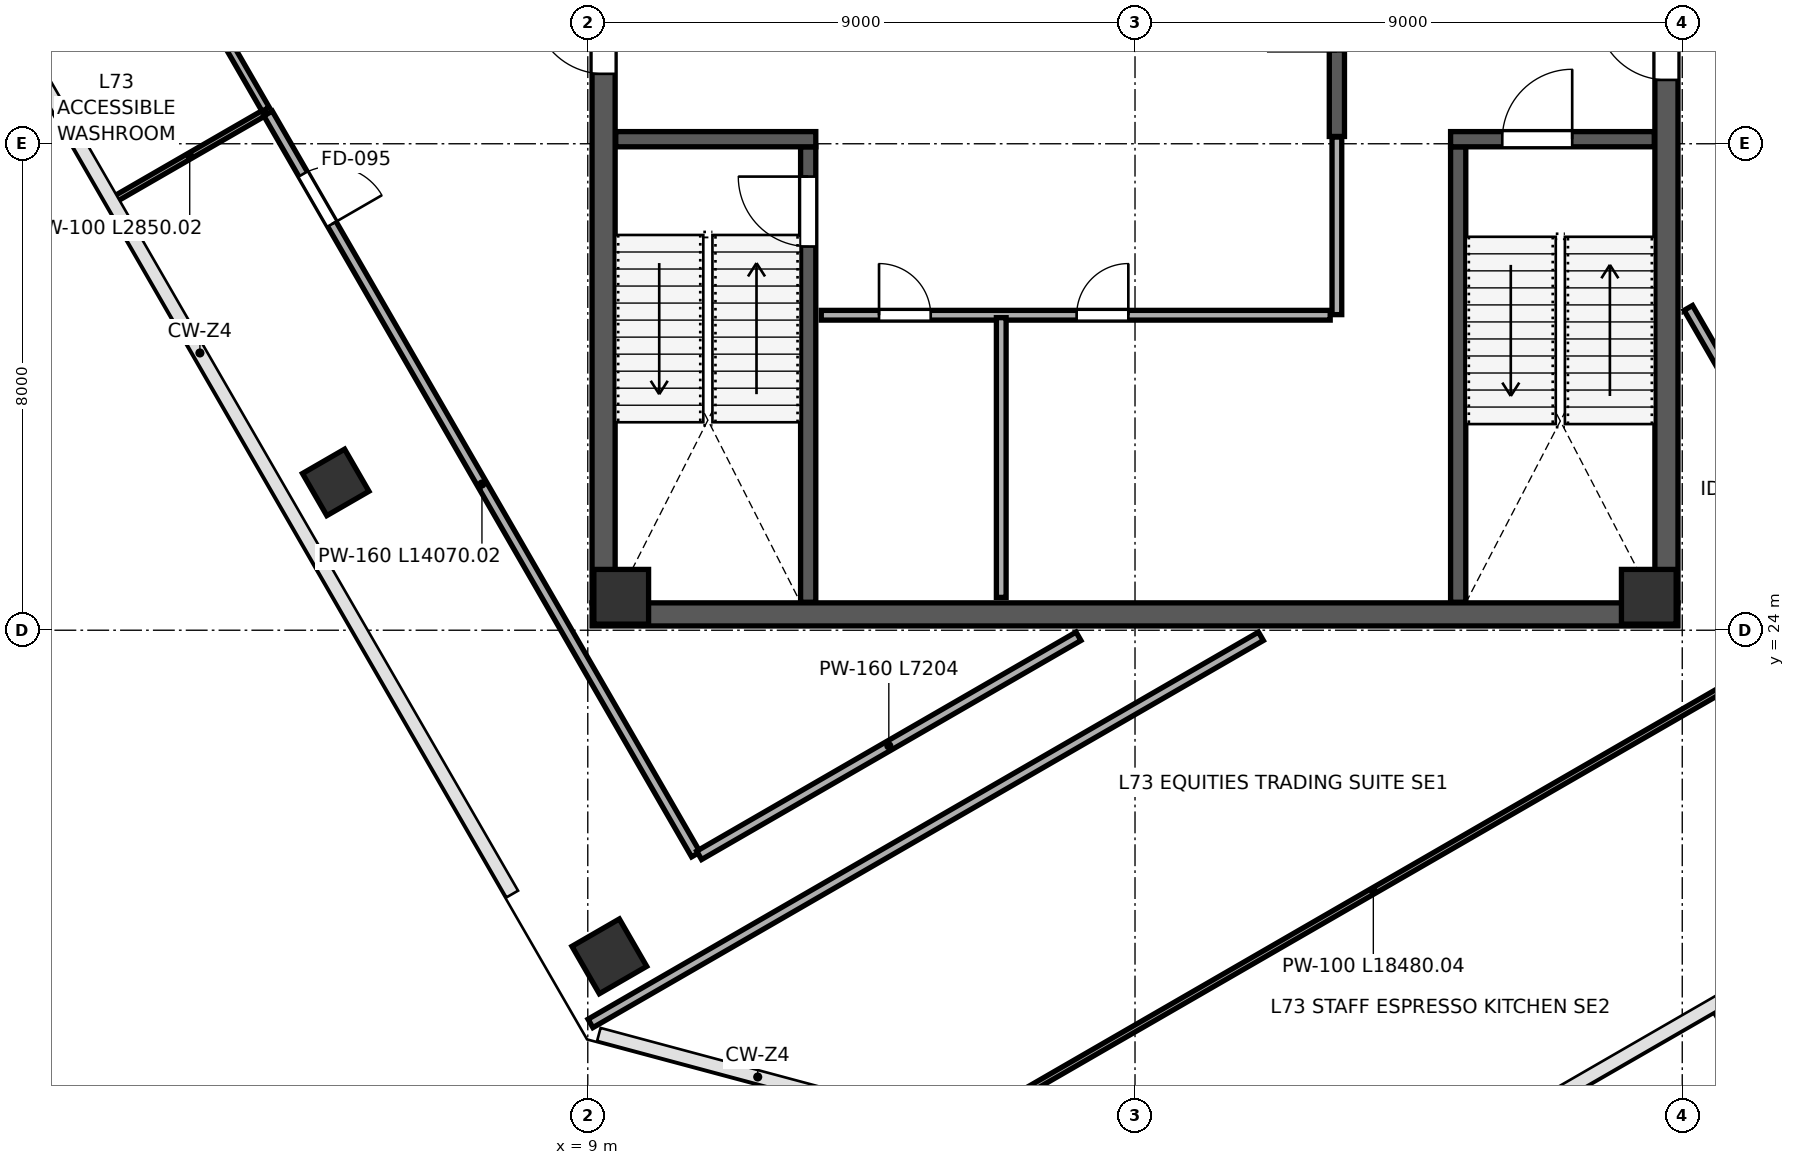
"""IFC4 building model, lengths in metres.
Left out: names, types, materials, properties, quantities, classifications, styles, units other than length and angle.
Written with IfcOpenShell. Run it as: python <this file> out.ifc"""

import sys

from ifc_helpers import new_model, si_unit, direction, frame, frame_2d, origin, origin_2d, place, context, subcontext, project, spatial, rectangle, extrude, clip, halfspace, source, transform, mapped, element, fill, save


model = new_model("IFC4")
c1 = context("Model", 3, precision=1e-05, world=origin(), true_north=direction((0.0, 1.0)))
c2 = subcontext(c1, "Body", "Model", "MODEL_VIEW")
j1 = project(units=[si_unit("LENGTHUNIT", "METRE"), si_unit("PLANEANGLEUNIT", "RADIAN")], contexts=[c1])
p1 = place(None, origin())
s1 = spatial("IfcSite", under=j1, at=p1, CompositionType="ELEMENT")
p2 = place(p1, origin())
s2 = spatial("IfcBuilding", under=s1, at=p2, CompositionType="ELEMENT")
p3 = place(p2, frame((0.0, 0.0, 324.0)))
s3 = spatial("IfcBuildingStorey", under=s2, at=p3, CompositionType="ELEMENT", Elevation=324.0)
m1 = source(origin(), c2, "Body", "SweptSolid", [
    extrude(rectangle(XDim=0.9, YDim=0.9, at=origin_2d()), origin(), (0.0, 0.0, 1.0), 4.198),
])
for number, where, z_axis, x_axis in (
    (1, (9.55, 24.55, 0.001), (0.0, 0.0, 1.0), (1.0, 0.0, 0.0)),
    (2, (26.45, 24.55, 0.001), (0.0, 0.0, 1.0), (1.0, 0.0, 0.0)),
):
    element("IfcColumn", number, at=place(p3, frame(where, z_axis=z_axis, x_axis=x_axis)), inside=s3, PredefinedType="COLUMN", context=c2, shape_type="MappedRepresentation", body=[
        mapped(m1, transform((0.0, 0.0, 0.0), scale=1.0)),
    ])
p4 = place(p3, frame((4.854, 26.431, 0.0), z_axis=(-0.053240348787, 0.171329844216, 0.983774135532), x_axis=(0.73030076738, -0.665221355242, 0.155374829666)))
e3 = element("IfcColumn", 3, at=p4, inside=s3, PredefinedType="COLUMN", context=c2, shape_type="Clipping", body=[
    clip(clip(extrude(rectangle(XDim=0.8, YDim=0.8, at=origin_2d()), origin(), (0.0, 0.0, 1.0), 4.269), halfspace(frame((0.0, 0.0, 0.1), z_axis=(0.0, 0.0, -1.0), x_axis=(1.0, 0.0, 0.0)), False)), halfspace(frame((0.0, 0.0, 4.169), z_axis=(0.0, 0.0, 1.0), x_axis=(1.0, 0.0, 0.0)), False)),
])
p5 = place(p3, frame((9.354, 18.637, 0.0), z_axis=(-0.133747241833, 0.126948471317, 0.982850833511), x_axis=(0.961573158376, -0.223324610803, 0.159697148693)))
e4 = element("IfcColumn", 4, at=p5, inside=s3, PredefinedType="COLUMN", context=c2, shape_type="Clipping", body=[
    clip(clip(extrude(rectangle(XDim=0.9, YDim=0.9, at=origin_2d()), origin(), (0.0, 0.0, 1.0), 4.273), halfspace(frame((0.0, 0.0, 0.116), z_axis=(0.0, 0.0, -1.0), x_axis=(1.0, 0.0, 0.0)), False)), halfspace(frame((0.0, 0.0, 4.157), z_axis=(0.0, 0.0, 1.0), x_axis=(1.0, 0.0, 0.0)), False)),
])
p6 = place(p3, frame((9.26, 24.45, 0.0), z_axis=(0.0, 0.0, 1.0), x_axis=(0.0, 1.0, 0.0)))
e5 = element("IfcWall", 5, at=p6, inside=s3, PredefinedType="SHEAR", context=c2, shape_type="SweptSolid", body=[
    extrude(rectangle(XDim=15.1, YDim=0.38, at=frame_2d((7.55, 0.0))), origin(), (0.0, 0.0, 1.0), 3.96),
])
p7 = place(p6, frame((8.7, 0.0, 0.0)))
e6 = element("IfcOpeningElement", 6, at=p7, cuts=e5, PredefinedType="OPENING", context=c2, shape_type="SweptSolid", body=[
    extrude(rectangle(XDim=1.15, YDim=2.2, at=frame_2d((0.575, 1.1))), frame((0.0, 0.2, 0.0), z_axis=(0.0, -1.0, 0.0), x_axis=(1.0, 0.0, 0.0)), (0.0, 0.0, 1.0), 0.4),
])
p8 = place(p3, frame((26.74, 24.45, 0.0), z_axis=(0.0, 0.0, 1.0), x_axis=(0.0, 1.0, 0.0)))
e7 = element("IfcWall", 7, at=p8, inside=s3, PredefinedType="SHEAR", context=c2, shape_type="SweptSolid", body=[
    extrude(rectangle(XDim=15.1, YDim=0.38, at=frame_2d((7.55, 0.0))), origin(), (0.0, 0.0, 1.0), 3.96),
])
p9 = place(p8, frame((8.6, 0.0, 0.0)))
e8 = element("IfcOpeningElement", 8, at=p9, cuts=e7, PredefinedType="OPENING", context=c2, shape_type="SweptSolid", body=[
    extrude(rectangle(XDim=1.15, YDim=2.2, at=frame_2d((0.575, 1.1))), frame((0.0, 0.2, 0.0), z_axis=(0.0, -1.0, 0.0), x_axis=(1.0, 0.0, 0.0)), (0.0, 0.0, 1.0), 0.4),
])
p10 = place(p3, frame((9.07, 24.26, 0.0), z_axis=(0.0, 0.0, 1.0), x_axis=(1.0, 0.0, 0.0)))
e9 = element("IfcWall", 9, at=p10, inside=s3, PredefinedType="SHEAR", context=c2, shape_type="SweptSolid", body=[
    extrude(rectangle(XDim=17.86, YDim=0.38, at=frame_2d((8.93, 0.0))), origin(), (0.0, 0.0, 1.0), 3.96),
])
p11 = place(p3, frame((12.625, 24.46, 0.0), z_axis=(0.0, 0.0, 1.0), x_axis=(0.0, 1.0, 0.0)))
e10 = element("IfcWall", 10, at=p11, inside=s3, PredefinedType="SHEAR", context=c2, shape_type="SweptSolid", body=[
    extrude(rectangle(XDim=7.49, YDim=0.25, at=frame_2d((3.745, 0.0))), origin(), (0.0, 0.0, 1.0), 3.96),
])
p12 = place(p11, frame((5.85, 0.0, 0.0)))
e11 = element("IfcOpeningElement", 11, at=p12, cuts=e10, PredefinedType="OPENING", context=c2, shape_type="SweptSolid", body=[
    extrude(rectangle(XDim=1.15, YDim=2.2, at=frame_2d((0.575, 1.1))), frame((0.0, 0.135, 0.0), z_axis=(0.0, -1.0, 0.0), x_axis=(1.0, 0.0, 0.0)), (0.0, 0.0, 1.0), 0.27),
])
p13 = place(p3, frame((9.46, 32.075, 0.0), z_axis=(0.0, 0.0, 1.0), x_axis=(1.0, 0.0, 0.0)))
e12 = element("IfcWall", 12, at=p13, inside=s3, PredefinedType="SHEAR", context=c2, shape_type="SweptSolid", body=[
    extrude(rectangle(XDim=3.29, YDim=0.25, at=frame_2d((1.645, 0.0))), origin(), (0.0, 0.0, 1.0), 3.96),
])
p14 = place(p3, frame((23.315, 24.46, 0.0), z_axis=(0.0, 0.0, 1.0), x_axis=(0.0, 1.0, 0.0)))
e13 = element("IfcWall", 13, at=p14, inside=s3, PredefinedType="SHEAR", context=c2, shape_type="SweptSolid", body=[
    extrude(rectangle(XDim=7.49, YDim=0.25, at=frame_2d((3.745, 0.0))), origin(), (0.0, 0.0, 1.0), 3.96),
])
p15 = place(p3, frame((23.19, 32.075, 0.0), z_axis=(0.0, 0.0, 1.0), x_axis=(1.0, 0.0, 0.0)))
e14 = element("IfcWall", 14, at=p15, inside=s3, PredefinedType="SHEAR", context=c2, shape_type="SweptSolid", body=[
    extrude(rectangle(XDim=3.35, YDim=0.25, at=frame_2d((1.675, 0.0))), origin(), (0.0, 0.0, 1.0), 3.96),
])
p16 = place(p15, frame((0.85, 0.0, 0.0)))
e15 = element("IfcOpeningElement", 15, at=p16, cuts=e14, PredefinedType="OPENING", context=c2, shape_type="SweptSolid", body=[
    extrude(rectangle(XDim=1.15, YDim=2.2, at=frame_2d((0.575, 1.1))), frame((0.0, 0.135, 0.0), z_axis=(0.0, -1.0, 0.0), x_axis=(1.0, 0.0, 0.0)), (0.0, 0.0, 1.0), 0.27),
])
p17 = place(p3, frame((21.32, 32.12, 0.0), z_axis=(0.0, 0.0, 1.0), x_axis=(0.0, 1.0, 0.0)))
e16 = element("IfcWall", 16, at=p17, inside=s3, PredefinedType="SHEAR", context=c2, shape_type="SweptSolid", body=[
    extrude(rectangle(XDim=7.42, YDim=0.25, at=frame_2d((3.71, 0.0))), origin(), (0.0, 0.0, 1.0), 3.96),
])
p18 = place(p17, frame((1.4, 0.0, 0.0)))
e17 = element("IfcOpeningElement", 17, at=p18, cuts=e16, PredefinedType="OPENING", context=c2, shape_type="SweptSolid", body=[
    extrude(rectangle(XDim=1.15, YDim=2.2, at=frame_2d((0.575, 1.1))), frame((0.0, 0.135, 0.0), z_axis=(0.0, -1.0, 0.0), x_axis=(1.0, 0.0, 0.0)), (0.0, 0.0, 1.0), 0.27),
])
p19 = place(p3, frame((12.84, 29.18, 0.0), z_axis=(0.0, 0.0, 1.0), x_axis=(1.0, 0.0, 0.0)))
e18 = element("IfcWall", 18, at=p19, inside=s3, PredefinedType="PARTITIONING", context=c2, shape_type="SweptSolid", body=[
    extrude(rectangle(XDim=8.37, YDim=0.16, at=frame_2d((4.185, 0.0))), origin(), (0.0, 0.0, 1.0), 3.96),
])
p20 = place(p19, frame((0.95, 0.0, 0.0)))
e19 = element("IfcOpeningElement", 19, at=p20, cuts=e18, PredefinedType="OPENING", context=c2, shape_type="SweptSolid", body=[
    extrude(rectangle(XDim=0.85, YDim=2.1, at=frame_2d((0.425, 1.05))), frame((0.0, 0.09, 0.0), z_axis=(0.0, -1.0, 0.0), x_axis=(1.0, 0.0, 0.0)), (0.0, 0.0, 1.0), 0.18),
])
p21 = place(p19, frame((4.2, 0.0, 0.0)))
e20 = element("IfcOpeningElement", 20, at=p21, cuts=e18, PredefinedType="OPENING", context=c2, shape_type="SweptSolid", body=[
    extrude(rectangle(XDim=0.85, YDim=2.1, at=frame_2d((0.425, 1.05))), frame((0.0, 0.09, 0.0), z_axis=(0.0, -1.0, 0.0), x_axis=(1.0, 0.0, 0.0)), (0.0, 0.0, 1.0), 0.18),
])
p22 = place(p3, frame((15.8, 24.54, 0.0), z_axis=(0.0, 0.0, 1.0), x_axis=(0.0, 1.0, 0.0)))
e21 = element("IfcWall", 21, at=p22, inside=s3, PredefinedType="PARTITIONING", context=c2, shape_type="SweptSolid", body=[
    extrude(rectangle(XDim=4.6, YDim=0.16, at=frame_2d((2.3, 0.0))), origin(), (0.0, 0.0, 1.0), 3.96),
])
p23 = place(p3, frame((21.32, 29.19, 0.0), z_axis=(0.0, 0.0, 1.0), x_axis=(0.0, 1.0, 0.0)))
e22 = element("IfcWall", 22, at=p23, inside=s3, PredefinedType="PARTITIONING", context=c2, shape_type="SweptSolid", body=[
    extrude(rectangle(XDim=2.92, YDim=0.16, at=frame_2d((1.46, 0.0))), origin(), (0.0, 0.0, 1.0), 3.96),
])
p24 = place(p3, frame((1.219, 31.087, 0.0), z_axis=(0.0, 0.0, 1.0), x_axis=(0.866062911188, 0.499935029643, 0.0)))
e23 = element("IfcWall", 23, at=p24, inside=s3, PredefinedType="PARTITIONING", context=c2, shape_type="SweptSolid", body=[
    extrude(rectangle(XDim=2.85, YDim=0.1, at=frame_2d((1.425, 0.0))), origin(), (0.0, 0.0, 1.0), 3.295),
])
p25 = place(p3, frame((-0.008, 38.993, 0.0), z_axis=(0.0, 0.0, 1.0), x_axis=(0.49998923004, -0.866031621735, 0.0)))
e24 = element("IfcWall", 24, at=p25, inside=s3, PredefinedType="PARTITIONING", context=c2, shape_type="SweptSolid", body=[
    extrude(rectangle(XDim=7.42, YDim=0.135, at=frame_2d((3.71, 0.0))), origin(), (0.0, 0.0, 1.0), 3.96),
])
p26 = place(p25, frame((1.7, 0.0, 0.0)))
e25 = element("IfcOpeningElement", 25, at=p26, cuts=e24, PredefinedType="OPENING", context=c2, shape_type="SweptSolid", body=[
    extrude(rectangle(XDim=0.9, YDim=2.15, at=frame_2d((0.45, 1.075))), frame((0.0, 0.078, 0.0), z_axis=(0.0, -1.0, 0.0), x_axis=(1.0, 0.0, 0.0)), (0.0, 0.0, 1.0), 0.155),
])
p27 = place(p25, frame((5.0, 0.0, 0.0)))
e26 = element("IfcOpeningElement", 26, at=p27, cuts=e24, PredefinedType="OPENING", context=c2, shape_type="SweptSolid", body=[
    extrude(rectangle(XDim=0.95, YDim=2.15, at=frame_2d((0.475, 1.075))), frame((0.0, 0.078, 0.0), z_axis=(0.0, -1.0, 0.0), x_axis=(1.0, 0.0, 0.0)), (0.0, 0.0, 1.0), 0.155),
])
p28 = place(p3, frame((3.742, 32.498, 0.0), z_axis=(0.0, 0.0, 1.0), x_axis=(0.500005830994, -0.866022037233, 0.0)))
e27 = element("IfcWall", 27, at=p28, inside=s3, PredefinedType="PARTITIONING", context=c2, shape_type="SweptSolid", body=[
    extrude(rectangle(XDim=14.07, YDim=0.16, at=frame_2d((7.035, 0.0))), origin(), (0.0, 0.0, 1.0), 3.96),
])
p29 = place(p28, frame((1.15, 0.0, 0.0)))
e28 = element("IfcOpeningElement", 28, at=p29, cuts=e27, PredefinedType="OPENING", context=c2, shape_type="SweptSolid", body=[
    extrude(rectangle(XDim=0.95, YDim=2.15, at=frame_2d((0.475, 1.075))), frame((0.0, 0.09, 0.0), z_axis=(0.0, -1.0, 0.0), x_axis=(1.0, 0.0, 0.0)), (0.0, 0.0, 1.0), 0.18),
])
p30 = place(p3, frame((10.832, 20.298, 0.0), z_axis=(0.0, 0.0, 1.0), x_axis=(0.866042809144, 0.499969851821, 0.0)))
e29 = element("IfcWall", 29, at=p30, inside=s3, PredefinedType="PARTITIONING", context=c2, shape_type="SweptSolid", body=[
    extrude(rectangle(XDim=7.204, YDim=0.16, at=frame_2d((3.602, 0.0))), origin(), (0.0, 0.0, 1.0), 3.96),
])
p31 = place(p3, frame((27.1, 29.301, 0.0), z_axis=(0.0, 0.0, 1.0), x_axis=(0.499929606556, -0.866066041644, 0.0)))
e30 = element("IfcWall", 30, at=p31, inside=s3, PredefinedType="PARTITIONING", context=c2, shape_type="SweptSolid", body=[
    extrude(rectangle(XDim=1.122, YDim=0.16, at=frame_2d((0.561, 0.0))), origin(), (0.0, 0.0, 1.0), 3.96),
])
p32 = place(p3, frame((23.284, 49.669, 0.0), z_axis=(0.0, 0.0, 1.0), x_axis=(0.500004637929, -0.866022726058, 0.0)))
e31 = element("IfcWall", 31, at=p32, inside=s3, PredefinedType="PARTITIONING", context=c2, shape_type="SweptSolid", body=[
    extrude(rectangle(XDim=20.67, YDim=0.115, at=frame_2d((10.335, 0.0))), origin(), (0.0, 0.0, 1.0), 3.96),
])
p33 = place(p32, frame((1.05, 0.0, 0.0)))
e32 = element("IfcOpeningElement", 32, at=p33, cuts=e31, PredefinedType="OPENING", context=c2, shape_type="SweptSolid", body=[
    extrude(rectangle(XDim=0.95, YDim=2.15, at=frame_2d((0.475, 1.075))), frame((0.0, 0.067, 0.0), z_axis=(0.0, -1.0, 0.0), x_axis=(1.0, 0.0, 0.0)), (0.0, 0.0, 1.0), 0.135),
])
p34 = place(p32, frame((8.2, 0.0, 0.0)))
e33 = element("IfcOpeningElement", 33, at=p34, cuts=e31, PredefinedType="OPENING", context=c2, shape_type="SweptSolid", body=[
    extrude(rectangle(XDim=0.95, YDim=2.15, at=frame_2d((0.475, 1.075))), frame((0.0, 0.067, 0.0), z_axis=(0.0, -1.0, 0.0), x_axis=(1.0, 0.0, 0.0)), (0.0, 0.0, 1.0), 0.135),
])
p35 = place(p3, frame((9.044, 17.534, 0.0), z_axis=(0.0, 0.0, 1.0), x_axis=(0.866029119881, 0.499993563477, 0.0)))
e34 = element("IfcWall", 34, at=p35, inside=s3, PredefinedType="PARTITIONING", context=c2, shape_type="SweptSolid", body=[
    extrude(rectangle(XDim=12.732, YDim=0.16, at=frame_2d((6.366, 0.0))), origin(), (0.0, 0.0, 1.0), 3.96),
])
p36 = place(p3, frame((13.917, 15.094, 0.0), z_axis=(0.0, 0.0, 1.0), x_axis=(0.86602564517, 0.499999581907, 0.0)))
e35 = element("IfcWall", 35, at=p36, inside=s3, PredefinedType="PARTITIONING", context=c2, shape_type="SweptSolid", body=[
    extrude(rectangle(XDim=18.48, YDim=0.1, at=frame_2d((9.24, 0.0))), origin(), (0.0, 0.0, 1.0), 3.96),
])
m2 = source(origin(), c2, "Body", "SweptSolid", [
    extrude(rectangle(XDim=1.15, YDim=2.2, at=frame_2d((0.575, 1.1))), frame((0.0, 0.025, 0.0), z_axis=(0.0, -1.0, 0.0), x_axis=(1.0, 0.0, 0.0)), (0.0, 0.0, 1.0), 0.05),
])
p37 = place(p12, origin())
e36 = element("IfcDoor", 36, at=p37, inside=s3, OperationType="SINGLE_SWING_RIGHT", PredefinedType="DOOR", context=c2, shape_type="MappedRepresentation", body=[
    mapped(m2, transform((0.0, 0.0, 0.0), scale=1.0)),
])
fill(e11, e36)
p38 = place(p16, origin())
e37 = element("IfcDoor", 37, at=p38, inside=s3, OperationType="SINGLE_SWING_RIGHT", PredefinedType="DOOR", context=c2, shape_type="MappedRepresentation", body=[
    mapped(m2, transform((0.0, 0.0, 0.0), scale=1.0)),
])
fill(e15, e37)
m3 = source(origin(), c2, "Body", "SweptSolid", [
    extrude(rectangle(XDim=1.15, YDim=2.2, at=frame_2d((0.575, 1.1))), frame((0.0, 0.025, 0.0), z_axis=(0.0, -1.0, 0.0), x_axis=(1.0, 0.0, 0.0)), (0.0, 0.0, 1.0), 0.05),
])
p39 = place(p9, origin())
e38 = element("IfcDoor", 38, at=p39, inside=s3, OperationType="SINGLE_SWING_RIGHT", PredefinedType="DOOR", context=c2, shape_type="MappedRepresentation", body=[
    mapped(m3, transform((0.0, 0.0, 0.0), scale=1.0)),
])
fill(e8, e38)
p40 = place(p7, origin())
e39 = element("IfcDoor", 39, at=p40, inside=s3, OperationType="SINGLE_SWING_RIGHT", PredefinedType="DOOR", context=c2, shape_type="MappedRepresentation", body=[
    mapped(m3, transform((0.0, 0.0, 0.0), scale=1.0)),
])
fill(e6, e39)
m4 = source(origin(), c2, "Body", "SweptSolid", [
    extrude(rectangle(XDim=0.85, YDim=2.1, at=frame_2d((0.425, 1.05))), frame((0.0, 0.025, 0.0), z_axis=(0.0, -1.0, 0.0), x_axis=(1.0, 0.0, 0.0)), (0.0, 0.0, 1.0), 0.05),
])
p41 = place(p20, origin())
e40 = element("IfcDoor", 40, at=p41, inside=s3, OperationType="SINGLE_SWING_LEFT", PredefinedType="DOOR", context=c2, shape_type="MappedRepresentation", body=[
    mapped(m4, transform((0.0, 0.0, 0.0), scale=1.0)),
])
fill(e19, e40)
p42 = place(p21, origin())
e41 = element("IfcDoor", 41, at=p42, inside=s3, OperationType="SINGLE_SWING_RIGHT", PredefinedType="DOOR", context=c2, shape_type="MappedRepresentation", body=[
    mapped(m4, transform((0.0, 0.0, 0.0), scale=1.0)),
])
fill(e20, e41)
m5 = source(origin(), c2, "Body", "SweptSolid", [
    extrude(rectangle(XDim=0.95, YDim=2.15, at=frame_2d((0.475, 1.075))), frame((0.0, 0.025, 0.0), z_axis=(0.0, -1.0, 0.0), x_axis=(1.0, 0.0, 0.0)), (0.0, 0.0, 1.0), 0.05),
])
p43 = place(p29, origin())
e42 = element("IfcDoor", 42, at=p43, inside=s3, OperationType="SINGLE_SWING_RIGHT", PredefinedType="DOOR", context=c2, shape_type="MappedRepresentation", body=[
    mapped(m5, transform((0.0, 0.0, 0.0), scale=1.0)),
])
fill(e28, e42)
save(model, sys.argv[1])
